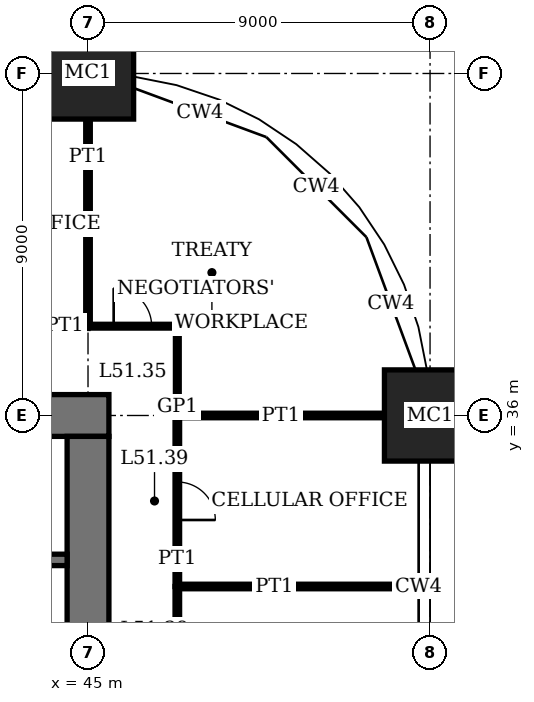
"""IFC4 building model, lengths in metres.
Left out: names, types, materials, properties, quantities, classifications, styles, units other than length and angle.
Written with IfcOpenShell. Run it as: python <this file> out.ifc"""

import sys

from ifc_helpers import new_model, si_unit, direction, frame, frame_2d, origin, origin_2d, place, context, subcontext, project, spatial, rectangle, extrude, element, fill, save


model = new_model("IFC4")
c1 = context("Model", 3, precision=1e-05, world=origin(), true_north=direction((0.0, 1.0)))
c2 = subcontext(c1, "Body", "Model", "MODEL_VIEW")
j1 = project(units=[si_unit("LENGTHUNIT", "METRE"), si_unit("PLANEANGLEUNIT", "RADIAN")], contexts=[c1])
p1 = place(None, origin())
s1 = spatial("IfcSite", under=j1, at=p1, CompositionType="ELEMENT")
p2 = place(p1, origin())
s2 = spatial("IfcBuilding", under=s1, at=p2, CompositionType="ELEMENT")
p3 = place(p2, frame((0.0, 0.0, 210.2)))
s3 = spatial("IfcBuildingStorey", under=s2, at=p3, CompositionType="ELEMENT", Elevation=210.2)
for number, where, z_axis, x_axis in (
    (1, (45.0, 45.0, 0.0), (0.0, 0.0, 1.0), (1.0, 0.0, 0.0)),
    (2, (54.0, 36.0, 0.0), (0.0, 0.0, 1.0), (1.0, 0.0, 0.0)),
):
    element("IfcColumn", number, at=place(p3, frame(where, z_axis=z_axis, x_axis=x_axis)), inside=s3, PredefinedType="COLUMN", context=c2, shape_type="SweptSolid", body=[
        extrude(rectangle(XDim=2.4, YDim=2.4, at=origin_2d()), origin(), (0.0, 0.0, 1.0), 4.0),
    ])
p4 = place(p3, frame((45.55, 36.0, 0.0), z_axis=(0.0, 0.0, 1.0), x_axis=(-1.0, 0.0, 0.0)))
e3 = element("IfcWall", 3, at=p4, inside=s3, PredefinedType="SHEAR", context=c2, shape_type="SweptSolid", body=[
    extrude(rectangle(XDim=28.1, YDim=1.1, at=frame_2d((14.05, 0.0))), origin(), (0.0, 0.0, 1.0), 4.0),
])
p5 = place(p4, frame((11.55, 0.0, 0.0)))
e4 = element("IfcOpeningElement", 4, at=p5, cuts=e3, PredefinedType="OPENING", context=c2, shape_type="SweptSolid", body=[
    extrude(rectangle(XDim=1.0, YDim=2.4, at=frame_2d((0.5, 1.2))), frame((0.0, 0.56, 0.0), z_axis=(0.0, -1.0, 0.0), x_axis=(1.0, 0.0, 0.0)), (0.0, 0.0, 1.0), 1.12),
])
p6 = place(p4, frame((16.55, 0.0, 0.0)))
e5 = element("IfcOpeningElement", 5, at=p6, cuts=e3, PredefinedType="OPENING", context=c2, shape_type="SweptSolid", body=[
    extrude(rectangle(XDim=1.0, YDim=2.4, at=frame_2d((0.5, 1.2))), frame((0.0, 0.56, 0.0), z_axis=(0.0, -1.0, 0.0), x_axis=(1.0, 0.0, 0.0)), (0.0, 0.0, 1.0), 1.12),
])
p7 = place(p4, frame((20.0, 0.0, 0.0)))
e6 = element("IfcOpeningElement", 6, at=p7, cuts=e3, PredefinedType="OPENING", context=c2, shape_type="SweptSolid", body=[
    extrude(rectangle(XDim=1.1, YDim=2.4, at=frame_2d((0.55, 1.2))), frame((0.0, 0.56, 0.0), z_axis=(0.0, -1.0, 0.0), x_axis=(1.0, 0.0, 0.0)), (0.0, 0.0, 1.0), 1.12),
])
p8 = place(p4, frame((24.05, 0.0, 0.0)))
e7 = element("IfcOpeningElement", 7, at=p8, cuts=e3, PredefinedType="OPENING", context=c2, shape_type="SweptSolid", body=[
    extrude(rectangle(XDim=1.0, YDim=2.4, at=frame_2d((0.5, 1.2))), frame((0.0, 0.56, 0.0), z_axis=(0.0, -1.0, 0.0), x_axis=(1.0, 0.0, 0.0)), (0.0, 0.0, 1.0), 1.12),
])
p9 = place(p3, frame((45.0, 18.55, 0.0), z_axis=(0.0, 0.0, 1.0), x_axis=(0.0, 1.0, 0.0)))
e8 = element("IfcWall", 8, at=p9, inside=s3, PredefinedType="SHEAR", context=c2, shape_type="SweptSolid", body=[
    extrude(rectangle(XDim=16.9, YDim=1.1, at=frame_2d((8.45, 0.0))), origin(), (0.0, 0.0, 1.0), 4.0),
])
p10 = place(p9, frame((8.45, 0.0, 0.0)))
e9 = element("IfcOpeningElement", 9, at=p10, cuts=e8, PredefinedType="OPENING", context=c2, shape_type="SweptSolid", body=[
    extrude(rectangle(XDim=1.8, YDim=2.4, at=frame_2d((0.9, 1.2))), frame((0.0, 0.56, 0.0), z_axis=(0.0, -1.0, 0.0), x_axis=(1.0, 0.0, 0.0)), (0.0, 0.0, 1.0), 1.12),
])
p11 = place(p3, frame((36.15, 32.2, 0.0), z_axis=(0.0, 0.0, 1.0), x_axis=(1.0, 0.0, 0.0)))
e10 = element("IfcWall", 10, at=p11, inside=s3, PredefinedType="SHEAR", context=c2, shape_type="SweptSolid", body=[
    extrude(rectangle(XDim=8.3, YDim=0.3, at=frame_2d((4.15, 0.0))), origin(), (0.0, 0.0, 1.0), 4.0),
])
p12 = place(p11, frame((0.45, 0.0, 0.0)))
e11 = element("IfcOpeningElement", 11, at=p12, cuts=e10, PredefinedType="OPENING", context=c2, shape_type="SweptSolid", body=[
    extrude(rectangle(XDim=1.0, YDim=2.4, at=frame_2d((0.5, 1.2))), frame((0.0, 0.16, 0.0), z_axis=(0.0, -1.0, 0.0), x_axis=(1.0, 0.0, 0.0)), (0.0, 0.0, 1.0), 0.32),
])
p13 = place(p3, frame((47.35, 31.5, 0.0), z_axis=(0.0, 0.0, 1.0), x_axis=(1.0, 0.0, 0.0)))
e12 = element("IfcWall", 12, at=p13, inside=s3, PredefinedType="PARTITIONING", context=c2, shape_type="SweptSolid", body=[
    extrude(rectangle(XDim=6.34, YDim=0.12, at=frame_2d((3.17, 0.0))), origin(), (0.0, 0.0, 1.0), 3.1),
])
p14 = place(p3, frame((47.35, 36.0, 0.0), z_axis=(0.0, 0.0, 1.0), x_axis=(1.0, 0.0, 0.0)))
e13 = element("IfcWall", 13, at=p14, inside=s3, PredefinedType="PARTITIONING", context=c2, shape_type="SweptSolid", body=[
    extrude(rectangle(XDim=5.45, YDim=0.12, at=frame_2d((2.725, 0.0))), origin(), (0.0, 0.0, 1.0), 3.05),
])
p15 = place(p3, frame((40.5, 38.35, 0.0), z_axis=(0.0, 0.0, 1.0), x_axis=(1.0, 0.0, 0.0)))
e14 = element("IfcWall", 14, at=p15, inside=s3, PredefinedType="PARTITIONING", context=c2, shape_type="SweptSolid", body=[
    extrude(rectangle(XDim=4.5, YDim=0.12, at=frame_2d((2.25, 0.0))), origin(), (0.0, 0.0, 1.0), 3.75),
])
p16 = place(p15, frame((1.75, 0.0, 0.0)))
e15 = element("IfcOpeningElement", 15, at=p16, cuts=e14, PredefinedType="OPENING", context=c2, shape_type="SweptSolid", body=[
    extrude(rectangle(XDim=1.0, YDim=2.4, at=frame_2d((0.5, 1.2))), frame((0.0, 0.07, 0.0), z_axis=(0.0, -1.0, 0.0), x_axis=(1.0, 0.0, 0.0)), (0.0, 0.0, 1.0), 0.14),
])
p17 = place(p3, frame((45.0, 38.35, 0.0), z_axis=(0.0, 0.0, 1.0), x_axis=(1.0, 0.0, 0.0)))
e16 = element("IfcWall", 16, at=p17, inside=s3, PredefinedType="PARTITIONING", context=c2, shape_type="SweptSolid", body=[
    extrude(rectangle(XDim=2.35, YDim=0.1, at=frame_2d((1.175, 0.0))), origin(), (0.0, 0.0, 1.0), 3.75),
])
p18 = place(p17, frame((0.675, 0.0, 0.0)))
e17 = element("IfcOpeningElement", 17, at=p18, cuts=e16, PredefinedType="OPENING", context=c2, shape_type="SweptSolid", body=[
    extrude(rectangle(XDim=1.0, YDim=2.4, at=frame_2d((0.5, 1.2))), frame((0.0, 0.06, 0.0), z_axis=(0.0, -1.0, 0.0), x_axis=(1.0, 0.0, 0.0)), (0.0, 0.0, 1.0), 0.12),
])
p19 = place(p3, frame((45.0, 38.35, 0.0), z_axis=(0.0, 0.0, 1.0), x_axis=(0.0, 1.0, 0.0)))
e18 = element("IfcWall", 18, at=p19, inside=s3, PredefinedType="PARTITIONING", context=c2, shape_type="SweptSolid", body=[
    extrude(rectangle(XDim=5.45, YDim=0.12, at=frame_2d((2.725, 0.0))), origin(), (0.0, 0.0, 1.0), 3.05),
])
p20 = place(p3, frame((47.35, 27.0, 0.0), z_axis=(0.0, 0.0, 1.0), x_axis=(0.0, 1.0, 0.0)))
e19 = element("IfcWall", 19, at=p20, inside=s3, PredefinedType="PARTITIONING", context=c2, shape_type="SweptSolid", body=[
    extrude(rectangle(XDim=4.5, YDim=0.12, at=frame_2d((2.25, 0.0))), origin(), (0.0, 0.0, 1.0), 3.75),
])
p21 = place(p20, frame((1.75, 0.0, 0.0)))
e20 = element("IfcOpeningElement", 20, at=p21, cuts=e19, PredefinedType="OPENING", context=c2, shape_type="SweptSolid", body=[
    extrude(rectangle(XDim=1.0, YDim=2.4, at=frame_2d((0.5, 1.2))), frame((0.0, 0.07, 0.0), z_axis=(0.0, -1.0, 0.0), x_axis=(1.0, 0.0, 0.0)), (0.0, 0.0, 1.0), 0.14),
])
p22 = place(p3, frame((47.35, 31.5, 0.0), z_axis=(0.0, 0.0, 1.0), x_axis=(0.0, 1.0, 0.0)))
e21 = element("IfcWall", 21, at=p22, inside=s3, PredefinedType="PARTITIONING", context=c2, shape_type="SweptSolid", body=[
    extrude(rectangle(XDim=4.5, YDim=0.12, at=frame_2d((2.25, 0.0))), origin(), (0.0, 0.0, 1.0), 3.75),
])
p23 = place(p22, frame((1.75, 0.0, 0.0)))
e22 = element("IfcOpeningElement", 22, at=p23, cuts=e21, PredefinedType="OPENING", context=c2, shape_type="SweptSolid", body=[
    extrude(rectangle(XDim=1.0, YDim=2.4, at=frame_2d((0.5, 1.2))), frame((0.0, 0.07, 0.0), z_axis=(0.0, -1.0, 0.0), x_axis=(1.0, 0.0, 0.0)), (0.0, 0.0, 1.0), 0.14),
])
p24 = place(p3, frame((47.35, 36.0, 0.0), z_axis=(0.0, 0.0, 1.0), x_axis=(0.0, 1.0, 0.0)))
e23 = element("IfcWall", 23, at=p24, inside=s3, PredefinedType="PARTITIONING", context=c2, shape_type="SweptSolid", body=[
    extrude(rectangle(XDim=2.35, YDim=0.1, at=frame_2d((1.175, 0.0))), origin(), (0.0, 0.0, 1.0), 3.75),
])
p25 = place(p18, origin())
e24 = element("IfcDoor", 24, at=p25, inside=s3, OperationType="SINGLE_SWING_RIGHT", PredefinedType="DOOR", context=c2, shape_type="SweptSolid", body=[
    extrude(rectangle(XDim=1.0, YDim=2.4, at=frame_2d((0.5, 1.2))), frame((0.0, 0.02, 0.0), z_axis=(0.0, -1.0, 0.0), x_axis=(1.0, 0.0, 0.0)), (0.0, 0.0, 1.0), 0.04),
])
fill(e17, e24)
p26 = place(p23, origin())
e25 = element("IfcDoor", 25, at=p26, inside=s3, OperationType="SINGLE_SWING_LEFT", PredefinedType="DOOR", context=c2, shape_type="SweptSolid", body=[
    extrude(rectangle(XDim=1.0, YDim=2.4, at=frame_2d((0.5, 1.2))), frame((0.0, 0.025, 0.0), z_axis=(0.0, -1.0, 0.0), x_axis=(1.0, 0.0, 0.0)), (0.0, 0.0, 1.0), 0.05),
])
fill(e22, e25)
save(model, sys.argv[1])
